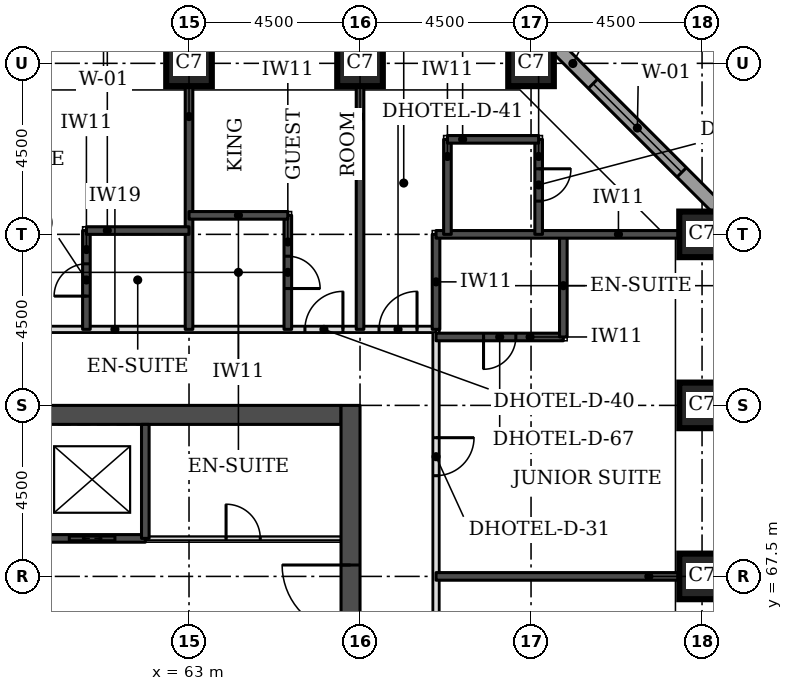
"""IFC4 building model, lengths in metres.
Left out: names, types, materials, properties, quantities, classifications, styles, units other than length and angle.
Written with IfcOpenShell. Run it as: python <this file> out.ifc"""

import sys

from ifc_helpers import new_model, si_unit, direction, frame, frame_2d, origin, origin_2d, place, context, subcontext, project, spatial, rectangle, extrude, element, fill, save


model = new_model("IFC4")
c1 = context("Model", 3, precision=1e-05, world=origin(), true_north=direction((0.0, 1.0)))
c2 = subcontext(c1, "Body", "Model", "MODEL_VIEW")
j1 = project(units=[si_unit("LENGTHUNIT", "METRE"), si_unit("PLANEANGLEUNIT", "RADIAN")], contexts=[c1])
p1 = place(None, origin())
s1 = spatial("IfcSite", under=j1, at=p1, CompositionType="ELEMENT")
p2 = place(p1, origin())
s2 = spatial("IfcBuilding", under=s1, at=p2, CompositionType="ELEMENT")
p3 = place(p2, frame((0.0, 0.0, 59.4)))
s3 = spatial("IfcBuildingStorey", under=s2, at=p3, CompositionType="ELEMENT", Elevation=59.4)
for number, where, z_axis, x_axis in (
    (1, (76.5, 67.5, 0.0), (0.0, 0.0, 1.0), (1.0, 0.0, 0.0)),
    (2, (76.5, 72.0, 0.0), (0.0, 0.0, 1.0), (1.0, 0.0, 0.0)),
    (3, (76.5, 76.5, 0.0), (0.0, 0.0, 1.0), (1.0, 0.0, 0.0)),
    (4, (63.0, 81.0, 0.0), (0.0, 0.0, 1.0), (1.0, 0.0, 0.0)),
    (5, (67.5, 81.0, 0.0), (0.0, 0.0, 1.0), (1.0, 0.0, 0.0)),
    (6, (72.0, 81.0, 0.0), (0.0, 0.0, 1.0), (1.0, 0.0, 0.0)),
):
    element("IfcColumn", number, at=place(p3, frame(where, z_axis=z_axis, x_axis=x_axis)), inside=s3, PredefinedType="COLUMN", context=c2, shape_type="SweptSolid", body=[
        extrude(rectangle(XDim=1.2, YDim=1.2, at=origin_2d()), origin(), (0.0, 0.0, 1.0), 3.3),
    ])
p4 = place(p3, frame((45.5, 71.75, 0.0), z_axis=(0.0, 0.0, 1.0), x_axis=(1.0, 0.0, 0.0)))
e7 = element("IfcWall", 7, at=p4, inside=s3, PredefinedType="SHEAR", context=c2, shape_type="SweptSolid", body=[
    extrude(rectangle(XDim=21.5, YDim=0.5, at=frame_2d((10.75, 0.0))), origin(), (0.0, 0.0, 1.0), 3.3),
])
p5 = place(p3, frame((67.25, 49.5, 0.0), z_axis=(0.0, 0.0, 1.0), x_axis=(0.0, 1.0, 0.0)))
e8 = element("IfcWall", 8, at=p5, inside=s3, PredefinedType="SHEAR", context=c2, shape_type="SweptSolid", body=[
    extrude(rectangle(XDim=22.5, YDim=0.5, at=frame_2d((11.25, 0.0))), origin(), (0.0, 0.0, 1.0), 3.3),
])
p6 = place(p5, frame((4.2, 0.0, 0.0)))
e9 = element("IfcOpeningElement", 9, at=p6, cuts=e8, PredefinedType="OPENING", context=c2, shape_type="SweptSolid", body=[
    extrude(rectangle(XDim=1.8, YDim=2.1, at=frame_2d((0.9, 1.05))), frame((0.0, 0.26, 0.0), z_axis=(0.0, -1.0, 0.0), x_axis=(1.0, 0.0, 0.0)), (0.0, 0.0, 1.0), 0.52),
])
p7 = place(p5, frame((6.9, 0.0, 0.0)))
e10 = element("IfcOpeningElement", 10, at=p7, cuts=e8, PredefinedType="OPENING", context=c2, shape_type="SweptSolid", body=[
    extrude(rectangle(XDim=1.1, YDim=2.1, at=frame_2d((0.55, 1.05))), frame((0.0, 0.26, 0.0), z_axis=(0.0, -1.0, 0.0), x_axis=(1.0, 0.0, 0.0)), (0.0, 0.0, 1.0), 0.52),
])
p8 = place(p5, frame((13.6, 0.0, 0.0)))
e11 = element("IfcOpeningElement", 11, at=p8, cuts=e8, PredefinedType="OPENING", context=c2, shape_type="SweptSolid", body=[
    extrude(rectangle(XDim=1.1, YDim=2.1, at=frame_2d((0.55, 1.05))), frame((0.0, 0.26, 0.0), z_axis=(0.0, -1.0, 0.0), x_axis=(1.0, 0.0, 0.0)), (0.0, 0.0, 1.0), 0.52),
])
p9 = place(p5, frame((16.5, 0.0, 0.0)))
e12 = element("IfcOpeningElement", 12, at=p9, cuts=e8, PredefinedType="OPENING", context=c2, shape_type="SweptSolid", body=[
    extrude(rectangle(XDim=1.8, YDim=2.1, at=frame_2d((0.9, 1.05))), frame((0.0, 0.26, 0.0), z_axis=(0.0, -1.0, 0.0), x_axis=(1.0, 0.0, 0.0)), (0.0, 0.0, 1.0), 0.52),
])
p10 = place(p3, frame((77.326, 76.77, 0.0), z_axis=(0.0, 0.0, 1.0), x_axis=(-0.707106781187, 0.707106781187, 0.0)))
e13 = element("IfcWall", 13, at=p10, inside=s3, PredefinedType="STANDARD", context=c2, shape_type="SweptSolid", body=[
    extrude(rectangle(XDim=7.151, YDim=0.35, at=frame_2d((3.576, 0.0))), origin(), (0.0, 0.0, 1.0), 3.055),
])
p11 = place(p10, frame((1.926, 0.0, 0.8)))
e14 = element("IfcOpeningElement", 14, at=p11, cuts=e13, PredefinedType="OPENING", context=c2, shape_type="SweptSolid", body=[
    extrude(rectangle(XDim=3.3, YDim=1.5, at=frame_2d((1.65, 0.75))), frame((0.0, 0.185, 0.0), z_axis=(0.0, -1.0, 0.0), x_axis=(1.0, 0.0, 0.0)), (0.0, 0.0, 1.0), 0.37),
])
p12 = place(p3, frame((69.5, 47.5, 0.0), z_axis=(0.0, 0.0, 1.0), x_axis=(0.0, 1.0, 0.0)))
e15 = element("IfcWall", 15, at=p12, inside=s3, PredefinedType="PARTITIONING", context=c2, shape_type="SweptSolid", body=[
    extrude(rectangle(XDim=26.5, YDim=0.15, at=frame_2d((13.25, 0.0))), origin(), (0.0, 0.0, 1.0), 3.08),
])
p13 = place(p12, frame((22.65, 0.0, 0.0)))
e16 = element("IfcOpeningElement", 16, at=p13, cuts=e15, PredefinedType="OPENING", context=c2, shape_type="SweptSolid", body=[
    extrude(rectangle(XDim=1.0, YDim=2.1, at=frame_2d((0.5, 1.05))), frame((0.0, 0.085, 0.0), z_axis=(0.0, -1.0, 0.0), x_axis=(1.0, 0.0, 0.0)), (0.0, 0.0, 1.0), 0.17),
])
p14 = place(p12, frame((16.6, 0.0, 0.0)))
e17 = element("IfcOpeningElement", 17, at=p14, cuts=e15, PredefinedType="OPENING", context=c2, shape_type="SweptSolid", body=[
    extrude(rectangle(XDim=1.0, YDim=2.1, at=frame_2d((0.5, 1.05))), frame((0.0, 0.085, 0.0), z_axis=(0.0, -1.0, 0.0), x_axis=(1.0, 0.0, 0.0)), (0.0, 0.0, 1.0), 0.17),
])
p15 = place(p12, frame((4.25, 0.0, 0.0)))
e18 = element("IfcOpeningElement", 18, at=p15, cuts=e15, PredefinedType="OPENING", context=c2, shape_type="SweptSolid", body=[
    extrude(rectangle(XDim=1.1, YDim=2.1, at=frame_2d((0.55, 1.05))), frame((0.0, 0.085, 0.0), z_axis=(0.0, -1.0, 0.0), x_axis=(1.0, 0.0, 0.0)), (0.0, 0.0, 1.0), 0.17),
])
p16 = place(p12, frame((0.55, 0.0, 0.0)))
e19 = element("IfcOpeningElement", 19, at=p16, cuts=e15, PredefinedType="OPENING", context=c2, shape_type="SweptSolid", body=[
    extrude(rectangle(XDim=1.0, YDim=2.1, at=frame_2d((0.5, 1.05))), frame((0.0, 0.085, 0.0), z_axis=(0.0, -1.0, 0.0), x_axis=(1.0, 0.0, 0.0)), (0.0, 0.0, 1.0), 0.17),
])
p17 = place(p3, frame((43.0, 74.0, 0.0), z_axis=(0.0, 0.0, 1.0), x_axis=(1.0, 0.0, 0.0)))
e20 = element("IfcWall", 20, at=p17, inside=s3, PredefinedType="PARTITIONING", context=c2, shape_type="SweptSolid", body=[
    extrude(rectangle(XDim=26.5, YDim=0.15, at=frame_2d((13.25, 0.0))), origin(), (0.0, 0.0, 1.0), 3.08),
])
p18 = place(p17, frame((7.6, 0.0, 0.0)))
e21 = element("IfcOpeningElement", 21, at=p18, cuts=e20, PredefinedType="OPENING", context=c2, shape_type="SweptSolid", body=[
    extrude(rectangle(XDim=1.0, YDim=2.1, at=frame_2d((0.5, 1.05))), frame((0.0, 0.085, 0.0), z_axis=(0.0, -1.0, 0.0), x_axis=(1.0, 0.0, 0.0)), (0.0, 0.0, 1.0), 0.17),
])
p19 = place(p17, frame((13.65, 0.0, 0.0)))
e22 = element("IfcOpeningElement", 22, at=p19, cuts=e20, PredefinedType="OPENING", context=c2, shape_type="SweptSolid", body=[
    extrude(rectangle(XDim=1.0, YDim=2.1, at=frame_2d((0.5, 1.05))), frame((0.0, 0.085, 0.0), z_axis=(0.0, -1.0, 0.0), x_axis=(1.0, 0.0, 0.0)), (0.0, 0.0, 1.0), 0.17),
])
p20 = place(p17, frame((23.05, 0.0, 0.0)))
e23 = element("IfcOpeningElement", 23, at=p20, cuts=e20, PredefinedType="OPENING", context=c2, shape_type="SweptSolid", body=[
    extrude(rectangle(XDim=1.0, YDim=2.1, at=frame_2d((0.5, 1.05))), frame((0.0, 0.085, 0.0), z_axis=(0.0, -1.0, 0.0), x_axis=(1.0, 0.0, 0.0)), (0.0, 0.0, 1.0), 0.17),
])
p21 = place(p17, frame((0.5, 0.0, 0.0)))
e24 = element("IfcOpeningElement", 24, at=p21, cuts=e20, PredefinedType="OPENING", context=c2, shape_type="SweptSolid", body=[
    extrude(rectangle(XDim=1.0, YDim=2.1, at=frame_2d((0.5, 1.05))), frame((0.0, 0.085, 0.0), z_axis=(0.0, -1.0, 0.0), x_axis=(1.0, 0.0, 0.0)), (0.0, 0.0, 1.0), 0.17),
])
p22 = place(p17, frame((25.0, 0.0, 0.0)))
e25 = element("IfcOpeningElement", 25, at=p22, cuts=e20, PredefinedType="OPENING", context=c2, shape_type="SweptSolid", body=[
    extrude(rectangle(XDim=1.0, YDim=2.1, at=frame_2d((0.5, 1.05))), frame((0.0, 0.085, 0.0), z_axis=(0.0, -1.0, 0.0), x_axis=(1.0, 0.0, 0.0)), (0.0, 0.0, 1.0), 0.17),
])
p23 = place(p3, frame((69.5, 67.5, 0.0), z_axis=(0.0, 0.0, 1.0), x_axis=(1.0, 0.0, 0.0)))
e26 = element("IfcWall", 26, at=p23, inside=s3, PredefinedType="SOLIDWALL", context=c2, shape_type="SweptSolid", body=[
    extrude(rectangle(XDim=6.4, YDim=0.2, at=frame_2d((3.2, 0.0))), origin(), (0.0, 0.0, 1.0), 3.08),
])
p24 = place(p3, frame((69.5, 73.8, 0.0), z_axis=(0.0, 0.0, 1.0), x_axis=(1.0, 0.0, 0.0)))
e27 = element("IfcWall", 27, at=p24, inside=s3, PredefinedType="SOLIDWALL", context=c2, shape_type="SweptSolid", body=[
    extrude(rectangle(XDim=3.35, YDim=0.2, at=frame_2d((1.675, 0.0))), origin(), (0.0, 0.0, 1.0), 3.08),
])
p25 = place(p24, frame((1.25, 0.0, 0.0)))
e28 = element("IfcOpeningElement", 28, at=p25, cuts=e27, PredefinedType="OPENING", context=c2, shape_type="SweptSolid", body=[
    extrude(rectangle(XDim=0.85, YDim=2.1, at=frame_2d((0.425, 1.05))), frame((0.0, 0.11, 0.0), z_axis=(0.0, -1.0, 0.0), x_axis=(1.0, 0.0, 0.0)), (0.0, 0.0, 1.0), 0.22),
])
p26 = place(p3, frame((72.85, 73.8, 0.0), z_axis=(0.0, 0.0, 1.0), x_axis=(0.0, 1.0, 0.0)))
e29 = element("IfcWall", 29, at=p26, inside=s3, PredefinedType="SOLIDWALL", context=c2, shape_type="SweptSolid", body=[
    extrude(rectangle(XDim=2.7, YDim=0.2, at=frame_2d((1.35, 0.0))), origin(), (0.0, 0.0, 1.0), 3.08),
])
p27 = place(p3, frame((60.3, 74.0, 0.0), z_axis=(0.0, 0.0, 1.0), x_axis=(0.0, 1.0, 0.0)))
e30 = element("IfcWall", 30, at=p27, inside=s3, PredefinedType="SOLIDWALL", context=c2, shape_type="SweptSolid", body=[
    extrude(rectangle(XDim=2.6, YDim=0.2, at=frame_2d((1.3, 0.0))), origin(), (0.0, 0.0, 1.0), 3.08),
])
p28 = place(p27, frame((0.875, 0.0, 0.0)))
e31 = element("IfcOpeningElement", 31, at=p28, cuts=e30, PredefinedType="OPENING", context=c2, shape_type="SweptSolid", body=[
    extrude(rectangle(XDim=0.85, YDim=2.1, at=frame_2d((0.425, 1.05))), frame((0.0, 0.11, 0.0), z_axis=(0.0, -1.0, 0.0), x_axis=(1.0, 0.0, 0.0)), (0.0, 0.0, 1.0), 0.22),
])
p29 = place(p3, frame((63.0, 74.0, 0.0), z_axis=(0.0, 0.0, 1.0), x_axis=(0.0, 1.0, 0.0)))
e32 = element("IfcWall", 32, at=p29, inside=s3, PredefinedType="SOLIDWALL", context=c2, shape_type="SweptSolid", body=[
    extrude(rectangle(XDim=6.4, YDim=0.2, at=frame_2d((3.2, 0.0))), origin(), (0.0, 0.0, 1.0), 3.08),
])
p30 = place(p3, frame((65.6, 74.0, 0.0), z_axis=(0.0, 0.0, 1.0), x_axis=(0.0, 1.0, 0.0)))
e33 = element("IfcWall", 33, at=p30, inside=s3, PredefinedType="SOLIDWALL", context=c2, shape_type="SweptSolid", body=[
    extrude(rectangle(XDim=3.0, YDim=0.2, at=frame_2d((1.5, 0.0))), origin(), (0.0, 0.0, 1.0), 3.08),
])
p31 = place(p30, frame((1.075, 0.0, 0.0)))
e34 = element("IfcOpeningElement", 34, at=p31, cuts=e33, PredefinedType="OPENING", context=c2, shape_type="SweptSolid", body=[
    extrude(rectangle(XDim=0.85, YDim=2.1, at=frame_2d((0.425, 1.05))), frame((0.0, 0.11, 0.0), z_axis=(0.0, -1.0, 0.0), x_axis=(1.0, 0.0, 0.0)), (0.0, 0.0, 1.0), 0.22),
])
p32 = place(p3, frame((67.5, 74.0, 0.0), z_axis=(0.0, 0.0, 1.0), x_axis=(0.0, 1.0, 0.0)))
e35 = element("IfcWall", 35, at=p32, inside=s3, PredefinedType="SOLIDWALL", context=c2, shape_type="SweptSolid", body=[
    extrude(rectangle(XDim=6.4, YDim=0.2, at=frame_2d((3.2, 0.0))), origin(), (0.0, 0.0, 1.0), 3.08),
])
p33 = place(p3, frame((69.5, 74.0, 0.0), z_axis=(0.0, 0.0, 1.0), x_axis=(0.0, 1.0, 0.0)))
e36 = element("IfcWall", 36, at=p33, inside=s3, PredefinedType="SOLIDWALL", context=c2, shape_type="SweptSolid", body=[
    extrude(rectangle(XDim=2.5, YDim=0.2, at=frame_2d((1.25, 0.0))), origin(), (0.0, 0.0, 1.0), 3.08),
])
p34 = place(p3, frame((69.5, 76.5, 0.0), z_axis=(0.0, 0.0, 1.0), x_axis=(1.0, 0.0, 0.0)))
e37 = element("IfcWall", 37, at=p34, inside=s3, PredefinedType="SOLIDWALL", context=c2, shape_type="SweptSolid", body=[
    extrude(rectangle(XDim=6.4, YDim=0.2, at=frame_2d((3.2, 0.0))), origin(), (0.0, 0.0, 1.0), 3.08),
])
p35 = place(p3, frame((69.8, 76.5, 0.0), z_axis=(0.0, 0.0, 1.0), x_axis=(0.0, 1.0, 0.0)))
e38 = element("IfcWall", 38, at=p35, inside=s3, PredefinedType="SOLIDWALL", context=c2, shape_type="SweptSolid", body=[
    extrude(rectangle(XDim=2.5, YDim=0.2, at=frame_2d((1.25, 0.0))), origin(), (0.0, 0.0, 1.0), 3.08),
])
p36 = place(p3, frame((72.2, 76.5, 0.0), z_axis=(0.0, 0.0, 1.0), x_axis=(0.0, 1.0, 0.0)))
e39 = element("IfcWall", 39, at=p36, inside=s3, PredefinedType="SOLIDWALL", context=c2, shape_type="SweptSolid", body=[
    extrude(rectangle(XDim=2.5, YDim=0.2, at=frame_2d((1.25, 0.0))), origin(), (0.0, 0.0, 1.0), 3.08),
])
p37 = place(p36, frame((0.875, 0.0, 0.0)))
e40 = element("IfcOpeningElement", 40, at=p37, cuts=e39, PredefinedType="OPENING", context=c2, shape_type="SweptSolid", body=[
    extrude(rectangle(XDim=0.85, YDim=2.1, at=frame_2d((0.425, 1.05))), frame((0.0, 0.11, 0.0), z_axis=(0.0, -1.0, 0.0), x_axis=(1.0, 0.0, 0.0)), (0.0, 0.0, 1.0), 0.22),
])
p38 = place(p3, frame((60.3, 76.6, 0.0), z_axis=(0.0, 0.0, 1.0), x_axis=(1.0, 0.0, 0.0)))
e41 = element("IfcWall", 41, at=p38, inside=s3, PredefinedType="SOLIDWALL", context=c2, shape_type="SweptSolid", body=[
    extrude(rectangle(XDim=2.7, YDim=0.2, at=frame_2d((1.35, 0.0))), origin(), (0.0, 0.0, 1.0), 3.08),
])
p39 = place(p3, frame((63.0, 77.0, 0.0), z_axis=(0.0, 0.0, 1.0), x_axis=(1.0, 0.0, 0.0)))
e42 = element("IfcWall", 42, at=p39, inside=s3, PredefinedType="SOLIDWALL", context=c2, shape_type="SweptSolid", body=[
    extrude(rectangle(XDim=2.6, YDim=0.2, at=frame_2d((1.3, 0.0))), origin(), (0.0, 0.0, 1.0), 3.08),
])
p40 = place(p3, frame((69.8, 79.0, 0.0), z_axis=(0.0, 0.0, 1.0), x_axis=(1.0, 0.0, 0.0)))
e43 = element("IfcWall", 43, at=p40, inside=s3, PredefinedType="SOLIDWALL", context=c2, shape_type="SweptSolid", body=[
    extrude(rectangle(XDim=2.4, YDim=0.2, at=frame_2d((1.2, 0.0))), origin(), (0.0, 0.0, 1.0), 3.08),
])
p41 = place(p3, frame((61.85, 68.5, 0.0), z_axis=(0.0, 0.0, 1.0), x_axis=(1.0, 0.0, 0.0)))
e44 = element("IfcWall", 44, at=p41, inside=s3, PredefinedType="PARTITIONING", context=c2, shape_type="SweptSolid", body=[
    extrude(rectangle(XDim=5.15, YDim=0.1, at=frame_2d((2.575, 0.0))), origin(), (0.0, 0.0, 1.0), 3.08),
])
p42 = place(p41, frame((2.125, 0.0, 0.0)))
e45 = element("IfcOpeningElement", 45, at=p42, cuts=e44, PredefinedType="OPENING", context=c2, shape_type="SweptSolid", body=[
    extrude(rectangle(XDim=0.9, YDim=2.1, at=frame_2d((0.45, 1.05))), frame((0.0, 0.06, 0.0), z_axis=(0.0, -1.0, 0.0), x_axis=(1.0, 0.0, 0.0)), (0.0, 0.0, 1.0), 0.12),
])
p43 = place(p3, frame((50.65, 68.5, 0.0), z_axis=(0.0, 0.0, 1.0), x_axis=(1.0, 0.0, 0.0)))
e46 = element("IfcWall", 46, at=p43, inside=s3, PredefinedType="SOLIDWALL", context=c2, shape_type="SweptSolid", body=[
    extrude(rectangle(XDim=11.2, YDim=0.2, at=frame_2d((5.6, 0.0))), origin(), (0.0, 0.0, 1.0), 3.08),
])
p44 = place(p43, frame((0.8, 0.0, 0.0)))
e47 = element("IfcOpeningElement", 47, at=p44, cuts=e46, PredefinedType="OPENING", context=c2, shape_type="SweptSolid", body=[
    extrude(rectangle(XDim=1.2, YDim=2.1, at=frame_2d((0.6, 1.05))), frame((0.0, 0.11, 0.0), z_axis=(0.0, -1.0, 0.0), x_axis=(1.0, 0.0, 0.0)), (0.0, 0.0, 1.0), 0.22),
])
p45 = place(p43, frame((3.6, 0.0, 0.0)))
e48 = element("IfcOpeningElement", 48, at=p45, cuts=e46, PredefinedType="OPENING", context=c2, shape_type="SweptSolid", body=[
    extrude(rectangle(XDim=1.2, YDim=2.1, at=frame_2d((0.6, 1.05))), frame((0.0, 0.11, 0.0), z_axis=(0.0, -1.0, 0.0), x_axis=(1.0, 0.0, 0.0)), (0.0, 0.0, 1.0), 0.22),
])
p46 = place(p43, frame((6.4, 0.0, 0.0)))
e49 = element("IfcOpeningElement", 49, at=p46, cuts=e46, PredefinedType="OPENING", context=c2, shape_type="SweptSolid", body=[
    extrude(rectangle(XDim=1.2, YDim=2.1, at=frame_2d((0.6, 1.05))), frame((0.0, 0.11, 0.0), z_axis=(0.0, -1.0, 0.0), x_axis=(1.0, 0.0, 0.0)), (0.0, 0.0, 1.0), 0.22),
])
p47 = place(p43, frame((9.2, 0.0, 0.0)))
e50 = element("IfcOpeningElement", 50, at=p47, cuts=e46, PredefinedType="OPENING", context=c2, shape_type="SweptSolid", body=[
    extrude(rectangle(XDim=1.2, YDim=2.1, at=frame_2d((0.6, 1.05))), frame((0.0, 0.11, 0.0), z_axis=(0.0, -1.0, 0.0), x_axis=(1.0, 0.0, 0.0)), (0.0, 0.0, 1.0), 0.22),
])
p48 = place(p3, frame((61.85, 68.5, 0.0), z_axis=(0.0, 0.0, 1.0), x_axis=(0.0, 1.0, 0.0)))
e51 = element("IfcWall", 51, at=p48, inside=s3, PredefinedType="SOLIDWALL", context=c2, shape_type="SweptSolid", body=[
    extrude(rectangle(XDim=3.0, YDim=0.2, at=frame_2d((1.5, 0.0))), origin(), (0.0, 0.0, 1.0), 3.08),
])
p49 = place(p11, origin())
e52 = element("IfcWindow", 52, at=p49, inside=s3, PartitioningType="SINGLE_PANEL", PredefinedType="WINDOW", context=c2, shape_type="SweptSolid", body=[
    extrude(rectangle(XDim=3.3, YDim=1.5, at=frame_2d((1.65, 0.75))), frame((0.0, 0.085, 0.0), z_axis=(0.0, -1.0, 0.0), x_axis=(1.0, 0.0, 0.0)), (0.0, 0.0, 1.0), 0.06),
])
fill(e14, e52)
p50 = place(p28, origin())
e53 = element("IfcDoor", 53, at=p50, inside=s3, OperationType="SINGLE_SWING_LEFT", PredefinedType="DOOR", context=c2, shape_type="SweptSolid", body=[
    extrude(rectangle(XDim=0.85, YDim=2.1, at=frame_2d((0.425, 1.05))), frame((0.0, 0.025, 0.0), z_axis=(0.0, -1.0, 0.0), x_axis=(1.0, 0.0, 0.0)), (0.0, 0.0, 1.0), 0.05),
])
fill(e31, e53)
p51 = place(p20, origin())
e54 = element("IfcDoor", 54, at=p51, inside=s3, OperationType="SINGLE_SWING_RIGHT", PredefinedType="DOOR", context=c2, shape_type="SweptSolid", body=[
    extrude(rectangle(XDim=1.0, YDim=2.1, at=frame_2d((0.5, 1.05))), frame((0.0, 0.025, 0.0), z_axis=(0.0, -1.0, 0.0), x_axis=(1.0, 0.0, 0.0)), (0.0, 0.0, 1.0), 0.05),
])
fill(e23, e54)
p52 = place(p31, frame((0.85, 0.0, 0.0), z_axis=(0.0, 0.0, 1.0), x_axis=(-1.0, 0.0, 0.0)))
e55 = element("IfcDoor", 55, at=p52, inside=s3, OperationType="SINGLE_SWING_RIGHT", PredefinedType="DOOR", context=c2, shape_type="SweptSolid", body=[
    extrude(rectangle(XDim=0.85, YDim=2.1, at=frame_2d((0.425, 1.05))), frame((0.0, 0.025, 0.0), z_axis=(0.0, -1.0, 0.0), x_axis=(1.0, 0.0, 0.0)), (0.0, 0.0, 1.0), 0.05),
])
fill(e34, e55)
p53 = place(p13, frame((1.0, 0.0, 0.0), z_axis=(0.0, 0.0, 1.0), x_axis=(-1.0, 0.0, 0.0)))
e56 = element("IfcDoor", 56, at=p53, inside=s3, OperationType="SINGLE_SWING_LEFT", PredefinedType="DOOR", context=c2, shape_type="SweptSolid", body=[
    extrude(rectangle(XDim=1.0, YDim=2.1, at=frame_2d((0.5, 1.05))), frame((0.0, 0.025, 0.0), z_axis=(0.0, -1.0, 0.0), x_axis=(1.0, 0.0, 0.0)), (0.0, 0.0, 1.0), 0.05),
])
fill(e16, e56)
p54 = place(p25, frame((0.85, 0.0, 0.0), z_axis=(0.0, 0.0, 1.0), x_axis=(-1.0, 0.0, 0.0)))
e57 = element("IfcDoor", 57, at=p54, inside=s3, OperationType="SINGLE_SWING_RIGHT", PredefinedType="DOOR", context=c2, shape_type="SweptSolid", body=[
    extrude(rectangle(XDim=0.85, YDim=2.1, at=frame_2d((0.425, 1.05))), frame((0.0, 0.025, 0.0), z_axis=(0.0, -1.0, 0.0), x_axis=(1.0, 0.0, 0.0)), (0.0, 0.0, 1.0), 0.05),
])
fill(e28, e57)
p55 = place(p22, origin())
e58 = element("IfcDoor", 58, at=p55, inside=s3, OperationType="SINGLE_SWING_RIGHT", PredefinedType="DOOR", context=c2, shape_type="SweptSolid", body=[
    extrude(rectangle(XDim=1.0, YDim=2.1, at=frame_2d((0.5, 1.05))), frame((0.0, 0.025, 0.0), z_axis=(0.0, -1.0, 0.0), x_axis=(1.0, 0.0, 0.0)), (0.0, 0.0, 1.0), 0.05),
])
fill(e25, e58)
p56 = place(p37, frame((0.85, 0.0, 0.0), z_axis=(0.0, 0.0, 1.0), x_axis=(-1.0, 0.0, 0.0)))
e59 = element("IfcDoor", 59, at=p56, inside=s3, OperationType="SINGLE_SWING_LEFT", PredefinedType="DOOR", context=c2, shape_type="SweptSolid", body=[
    extrude(rectangle(XDim=0.85, YDim=2.1, at=frame_2d((0.425, 1.05))), frame((0.0, 0.025, 0.0), z_axis=(0.0, -1.0, 0.0), x_axis=(1.0, 0.0, 0.0)), (0.0, 0.0, 1.0), 0.05),
])
fill(e40, e59)
p57 = place(p47, origin())
e60 = element("IfcDoor", 60, at=p57, inside=s3, OperationType="DOUBLE_DOOR_SLIDING", PredefinedType="DOOR", context=c2, shape_type="SweptSolid", body=[
    extrude(rectangle(XDim=1.2, YDim=2.1, at=frame_2d((0.6, 1.05))), frame((0.0, 0.025, 0.0), z_axis=(0.0, -1.0, 0.0), x_axis=(1.0, 0.0, 0.0)), (0.0, 0.0, 1.0), 0.05),
])
fill(e50, e60)
p58 = place(p9, origin())
e61 = element("IfcDoor", 61, at=p58, inside=s3, OperationType="SINGLE_SWING_RIGHT", PredefinedType="DOOR", context=c2, shape_type="SweptSolid", body=[
    extrude(rectangle(XDim=1.8, YDim=2.1, at=frame_2d((0.9, 1.05))), frame((0.0, 0.025, 0.0), z_axis=(0.0, -1.0, 0.0), x_axis=(1.0, 0.0, 0.0)), (0.0, 0.0, 1.0), 0.05),
])
fill(e12, e61)
p59 = place(p42, origin())
e62 = element("IfcDoor", 62, at=p59, inside=s3, OperationType="SINGLE_SWING_LEFT", PredefinedType="DOOR", context=c2, shape_type="SweptSolid", body=[
    extrude(rectangle(XDim=0.9, YDim=2.1, at=frame_2d((0.45, 1.05))), frame((0.0, 0.025, 0.0), z_axis=(0.0, -1.0, 0.0), x_axis=(1.0, 0.0, 0.0)), (0.0, 0.0, 1.0), 0.05),
])
fill(e45, e62)
save(model, sys.argv[1])
